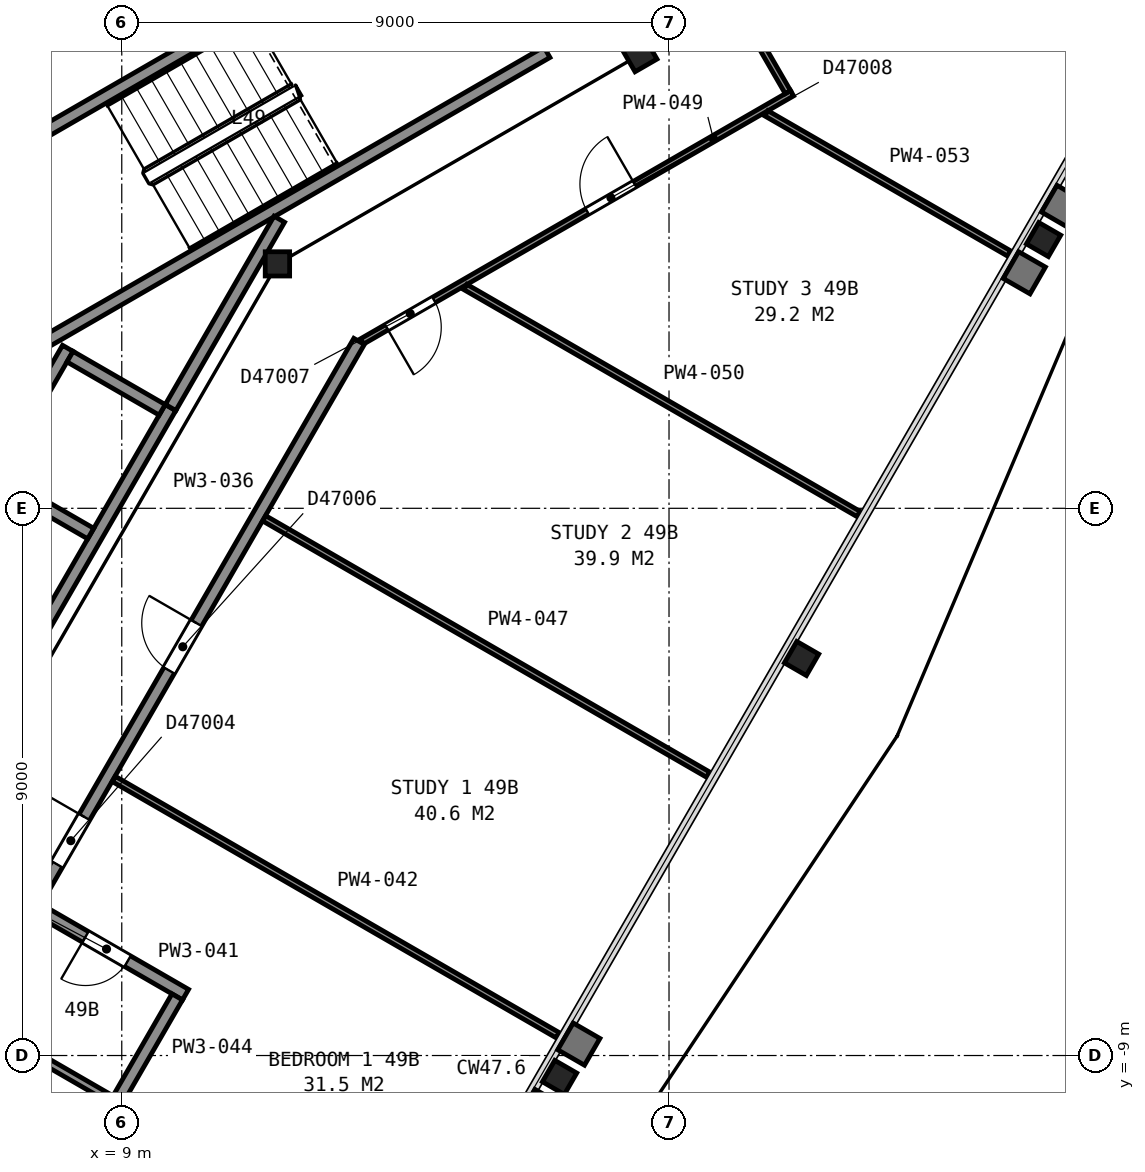
"""IFC4 building model, lengths in metres.
Left out: names, types, materials, properties, quantities, classifications, styles, units other than length and angle.
Written with IfcOpenShell. Run it as: python <this file> out.ifc"""

import sys

from ifc_helpers import new_model, si_unit, direction, frame, frame_2d, origin, origin_2d, place, context, subcontext, project, spatial, rectangle, i_section, extrude, element, fill, save


model = new_model("IFC4")
c1 = context("Model", 3, precision=1e-05, world=origin(), true_north=direction((0.0, 1.0)))
c2 = subcontext(c1, "Body", "Model", "MODEL_VIEW")
j1 = project(units=[si_unit("LENGTHUNIT", "METRE"), si_unit("PLANEANGLEUNIT", "RADIAN")], contexts=[c1])
p1 = place(None, origin())
s1 = spatial("IfcSite", under=j1, at=p1, CompositionType="ELEMENT")
p2 = place(p1, origin())
s2 = spatial("IfcBuilding", under=s1, at=p2, CompositionType="ELEMENT")
p3 = place(p2, frame((0.0, 0.0, 196.9)))
s3 = spatial("IfcBuildingStorey", under=s2, at=p3, CompositionType="ELEMENT", Elevation=196.9)
for number, where, z_axis, x_axis in (
    (1, (16.2, -9.36, 0.0), (0.0, 0.0, 1.0), (-0.5, -0.866, 0.0)),
    (2, (20.18, -2.47, 0.0), (0.0, 0.0, 1.0), (-0.5, -0.866, 0.0)),
    (3, (24.16, 4.42, 0.0), (0.0, 0.0, 1.0), (-0.5, -0.866, 0.0)),
):
    element("IfcColumn", number, at=place(p3, frame(where, z_axis=z_axis, x_axis=x_axis)), inside=s3, PredefinedType="COLUMN", context=c2, shape_type="SweptSolid", body=[
        extrude(i_section(OverallWidth=0.406, OverallDepth=0.417, WebThickness=0.03, FlangeThickness=0.048, FilletRadius=0.015, at=origin_2d()), origin(), (0.0, 0.0, 1.0), 3.01),
    ])
p4 = place(p3, frame((11.56, 4.02, 0.0), z_axis=(0.0, 0.0, 1.0), x_axis=(1.0, 0.0, 0.0)))
e4 = element("IfcColumn", 4, at=p4, inside=s3, PredefinedType="COLUMN", context=c2, shape_type="SweptSolid", body=[
    extrude(i_section(OverallWidth=0.401, OverallDepth=0.399, WebThickness=0.025, FlangeThickness=0.04, FilletRadius=0.015, at=origin_2d()), origin(), (0.0, 0.0, 1.0), 3.7),
])
p5 = place(p3, frame((17.52, 7.46, 0.0), z_axis=(0.0, 0.0, 1.0), x_axis=(0.5, -0.866025403784, 0.0)))
e5 = element("IfcColumn", 5, at=p5, inside=s3, PredefinedType="COLUMN", context=c2, shape_type="SweptSolid", body=[
    extrude(i_section(OverallWidth=0.406, OverallDepth=0.417, WebThickness=0.03, FlangeThickness=0.048, FilletRadius=0.015, at=origin_2d()), origin(), (0.0, 0.0, 1.0), 3.7),
])
p6 = place(p3, frame((15.855, 7.538, 0.0), z_axis=(0.0, 0.0, 1.0), x_axis=(-0.500049511043, 0.865996816683, 0.0)))
e6 = element("IfcWall", 6, at=p6, inside=s3, PredefinedType="PARTITIONING", context=c2, shape_type="SweptSolid", body=[
    extrude(rectangle(XDim=2.8, YDim=0.2, at=frame_2d((1.4, 0.0))), origin(), (0.0, 0.0, 1.0), 3.45),
])
p7 = place(p6, frame((0.85, 0.0, 0.0)))
e7 = element("IfcOpeningElement", 7, at=p7, cuts=e6, PredefinedType="OPENING", context=c2, shape_type="SweptSolid", body=[
    extrude(rectangle(XDim=1.1, YDim=2.1, at=frame_2d((0.55, 1.05))), frame((0.0, 0.11, 0.0), z_axis=(0.0, -1.0, 0.0), x_axis=(1.0, 0.0, 0.0)), (0.0, 0.0, 1.0), 0.22),
])
for number, where, z_axis, x_axis in (
    (8, (6.178, 5.299, 0.0), (0.0, 0.0, 1.0), (0.866, 0.5, 0.0)),
    (9, (7.678, 2.701, 0.0), (0.0, 0.0, 1.0), (0.866, 0.5, 0.0)),
):
    element("IfcWall", number, at=place(p3, frame(where, z_axis=z_axis, x_axis=x_axis)), inside=s3, PredefinedType="PARTITIONING", context=c2, shape_type="SweptSolid", body=[
        extrude(rectangle(XDim=9.6, YDim=0.2, at=frame_2d((4.8, 0.0))), origin(), (0.0, 0.0, 1.0), 3.45),
    ])
p8 = place(p3, frame((7.351, -2.587, 0.0), z_axis=(0.0, 0.0, 1.0), x_axis=(0.500002801628, 0.866023786258, 0.0)))
e10 = element("IfcWall", 10, at=p8, inside=s3, PredefinedType="PARTITIONING", context=c2, shape_type="SweptSolid", body=[
    extrude(rectangle(XDim=4.9, YDim=0.2, at=frame_2d((2.45, 0.0))), origin(), (0.0, 0.0, 1.0), 3.7),
])
p9 = place(p3, frame((5.663, -1.612, 0.0), z_axis=(0.0, 0.0, 1.0), x_axis=(0.49998122708, 0.866036242063, 0.0)))
e11 = element("IfcWall", 11, at=p9, inside=s3, PredefinedType="PARTITIONING", context=c2, shape_type="SweptSolid", body=[
    extrude(rectangle(XDim=4.9, YDim=0.2, at=frame_2d((2.45, 0.0))), origin(), (0.0, 0.0, 1.0), 3.7),
])
p10 = place(p3, frame((9.665, 1.62, 0.0), z_axis=(0.0, 0.0, 1.0), x_axis=(-0.866002029911, 0.500040482552, 0.0)))
e12 = element("IfcWall", 12, at=p10, inside=s3, PredefinedType="PARTITIONING", context=c2, shape_type="SweptSolid", body=[
    extrude(rectangle(XDim=1.75, YDim=0.2, at=frame_2d((0.875, 0.0))), origin(), (0.0, 0.0, 1.0), 3.7),
])
p11 = place(p3, frame((8.49, -0.416, 0.0), z_axis=(0.0, 0.0, 1.0), x_axis=(-0.866036909293, 0.499980071345, 0.0)))
e13 = element("IfcWall", 13, at=p11, inside=s3, PredefinedType="PARTITIONING", context=c2, shape_type="SweptSolid", body=[
    extrude(rectangle(XDim=1.75, YDim=0.2, at=frame_2d((0.875, 0.0))), origin(), (0.0, 0.0, 1.0), 3.7),
])
p12 = place(p3, frame((9.803, 1.658, 0.0), z_axis=(0.0, 0.0, 1.0), x_axis=(0.499943114462, 0.866058244174, 0.0)))
e14 = element("IfcWall", 14, at=p12, inside=s3, PredefinedType="PARTITIONING", context=c2, shape_type="SweptSolid", body=[
    extrude(rectangle(XDim=3.576, YDim=0.2, at=frame_2d((1.788, 0.0))), origin(), (0.0, 0.0, 1.0), 3.45),
])
p13 = place(p3, frame((12.903, 2.745, 0.0), z_axis=(0.0, 0.0, 1.0), x_axis=(-0.499992063946, -0.866029985619, 0.0)))
e15 = element("IfcWall", 15, at=p13, inside=s3, PredefinedType="PARTITIONING", context=c2, shape_type="SweptSolid", body=[
    extrude(rectangle(XDim=12.907, YDim=0.2, at=frame_2d((6.454, 0.0))), origin(), (0.0, 0.0, 1.0), 2.362),
])
p14 = place(p13, frame((9.032, 0.0, 0.0)))
e16 = element("IfcOpeningElement", 16, at=p14, cuts=e15, PredefinedType="OPENING", context=c2, shape_type="SweptSolid", body=[
    extrude(rectangle(XDim=0.9, YDim=2.1, at=frame_2d((0.45, 1.05))), frame((0.0, 0.11, 0.0), z_axis=(0.0, -1.0, 0.0), x_axis=(1.0, 0.0, 0.0)), (0.0, 0.0, 1.0), 0.22),
])
p15 = place(p13, frame((5.349, 0.0, 0.0)))
e17 = element("IfcOpeningElement", 17, at=p15, cuts=e15, PredefinedType="OPENING", context=c2, shape_type="SweptSolid", body=[
    extrude(rectangle(XDim=0.9, YDim=2.1, at=frame_2d((0.45, 1.05))), frame((0.0, 0.11, 0.0), z_axis=(0.0, -1.0, 0.0), x_axis=(1.0, 0.0, 0.0)), (0.0, 0.0, 1.0), 0.22),
])
p16 = place(p3, frame((6.576, -8.419, 0.0), z_axis=(0.0, 0.0, 1.0), x_axis=(0.866048155274, -0.499960591193, 0.0)))
e18 = element("IfcWall", 18, at=p16, inside=s3, PredefinedType="PARTITIONING", context=c2, shape_type="SweptSolid", body=[
    extrude(rectangle(XDim=8.431, YDim=0.125, at=frame_2d((4.215, 0.0))), origin(), (0.0, 0.0, 1.0), 2.362),
])
p17 = place(p3, frame((10.049, -7.999, 0.0), z_axis=(0.0, 0.0, 1.0), x_axis=(-0.866041588165, 0.499971966783, 0.0)))
e19 = element("IfcWall", 19, at=p17, inside=s3, PredefinedType="PARTITIONING", context=c2, shape_type="SweptSolid", body=[
    extrude(rectangle(XDim=2.795, YDim=0.2, at=frame_2d((1.397, 0.0))), origin(), (0.0, 0.0, 1.0), 2.362),
])
p18 = place(p17, frame((1.1, 0.0, 0.0)))
e20 = element("IfcOpeningElement", 20, at=p18, cuts=e19, PredefinedType="OPENING", context=c2, shape_type="SweptSolid", body=[
    extrude(rectangle(XDim=0.8, YDim=2.1, at=frame_2d((0.4, 1.05))), frame((0.0, 0.11, 0.0), z_axis=(0.0, -1.0, 0.0), x_axis=(1.0, 0.0, 0.0)), (0.0, 0.0, 1.0), 0.22),
])
p19 = place(p3, frame((8.869, -4.451, 0.0), z_axis=(0.0, 0.0, 1.0), x_axis=(0.866027858276, -0.499995748672, 0.0)))
e21 = element("IfcWall", 21, at=p19, inside=s3, PredefinedType="PARTITIONING", context=c2, shape_type="SweptSolid", body=[
    extrude(rectangle(XDim=8.429, YDim=0.1, at=frame_2d((4.214, 0.0))), origin(), (0.0, 0.0, 1.0), 2.362),
])
p20 = place(p3, frame((8.946, -9.709, 0.0), z_axis=(0.0, 0.0, 1.0), x_axis=(0.499970304126, 0.866042548026, 0.0)))
e22 = element("IfcWall", 22, at=p20, inside=s3, PredefinedType="PARTITIONING", context=c2, shape_type="SweptSolid", body=[
    extrude(rectangle(XDim=1.933, YDim=0.2, at=frame_2d((0.966, 0.0))), origin(), (0.0, 0.0, 1.0), 2.362),
])
p21 = place(p3, frame((11.343, -0.166, 0.0), z_axis=(0.0, 0.0, 1.0), x_axis=(0.866022557401, -0.500004930048, 0.0)))
e23 = element("IfcWall", 23, at=p21, inside=s3, PredefinedType="PARTITIONING", context=c2, shape_type="SweptSolid", body=[
    extrude(rectangle(XDim=8.429, YDim=0.1, at=frame_2d((4.215, 0.0))), origin(), (0.0, 0.0, 1.0), 2.362),
])
p22 = place(p3, frame((20.023, 6.826, 0.0), z_axis=(0.0, 0.0, 1.0), x_axis=(-0.86608949446, -0.499888975259, 0.0)))
e24 = element("IfcWall", 24, at=p22, inside=s3, PredefinedType="PARTITIONING", context=c2, shape_type="SweptSolid", body=[
    extrude(rectangle(XDim=8.165, YDim=0.1, at=frame_2d((4.083, 0.0))), origin(), (0.0, 0.0, 1.0), 2.362),
])
p23 = place(p22, frame((6.8, 0.0, 0.0)))
e25 = element("IfcOpeningElement", 25, at=p23, cuts=e24, PredefinedType="OPENING", context=c2, shape_type="SweptSolid", body=[
    extrude(rectangle(XDim=0.9, YDim=2.1, at=frame_2d((0.45, 1.05))), frame((0.0, 0.06, 0.0), z_axis=(0.0, -1.0, 0.0), x_axis=(1.0, 0.0, 0.0)), (0.0, 0.0, 1.0), 0.12),
])
p24 = place(p22, frame((2.989, 0.0, 0.0)))
e26 = element("IfcOpeningElement", 26, at=p24, cuts=e24, PredefinedType="OPENING", context=c2, shape_type="SweptSolid", body=[
    extrude(rectangle(XDim=0.9, YDim=2.1, at=frame_2d((0.45, 1.05))), frame((0.0, 0.06, 0.0), z_axis=(0.0, -1.0, 0.0), x_axis=(1.0, 0.0, 0.0)), (0.0, 0.0, 1.0), 0.12),
])
p25 = place(p3, frame((14.651, 3.64, 0.0), z_axis=(0.0, 0.0, 1.0), x_axis=(0.866021145342, -0.500007375767, 0.0)))
e27 = element("IfcWall", 27, at=p25, inside=s3, PredefinedType="PARTITIONING", context=c2, shape_type="SweptSolid", body=[
    extrude(rectangle(XDim=7.467, YDim=0.1, at=frame_2d((3.733, 0.0))), origin(), (0.0, 0.0, 1.0), 2.362),
])
p26 = place(p3, frame((15.928, 13.812, 0.0), z_axis=(0.0, 0.0, 1.0), x_axis=(0.500422653123, -0.865781247337, 0.0)))
e28 = element("IfcWall", 28, at=p26, inside=s3, PredefinedType="PARTITIONING", context=c2, shape_type="SweptSolid", body=[
    extrude(rectangle(XDim=8.047, YDim=0.1, at=frame_2d((4.024, 0.0))), origin(), (0.0, 0.0, 1.0), 2.362),
])
p27 = place(p26, frame((3.4, 0.0, 0.0)))
e29 = element("IfcOpeningElement", 29, at=p27, cuts=e28, PredefinedType="OPENING", context=c2, shape_type="SweptSolid", body=[
    extrude(rectangle(XDim=1.2, YDim=2.1, at=frame_2d((0.6, 1.05))), frame((0.0, 0.06, 0.0), z_axis=(0.0, -1.0, 0.0), x_axis=(1.0, 0.0, 0.0)), (0.0, 0.0, 1.0), 0.12),
])
p28 = place(p3, frame((19.601, 6.496, 0.0), z_axis=(0.0, 0.0, 1.0), x_axis=(0.866056775574, -0.499945658529, 0.0)))
e30 = element("IfcWall", 30, at=p28, inside=s3, PredefinedType="PARTITIONING", context=c2, shape_type="SweptSolid", body=[
    extrude(rectangle(XDim=4.608, YDim=0.1, at=frame_2d((2.304, 0.0))), origin(), (0.0, 0.0, 1.0), 2.362),
])
p29 = place(p14, origin())
e31 = element("IfcDoor", 31, at=p29, inside=s3, OperationType="SINGLE_SWING_LEFT", PredefinedType="DOOR", context=c2, shape_type="SweptSolid", body=[
    extrude(rectangle(XDim=0.9, YDim=2.1, at=frame_2d((0.45, 1.05))), frame((0.0, 0.025, 0.0), z_axis=(0.0, -1.0, 0.0), x_axis=(1.0, 0.0, 0.0)), (0.0, 0.0, 1.0), 0.05),
])
fill(e16, e31)
p30 = place(p15, origin())
e32 = element("IfcDoor", 32, at=p30, inside=s3, OperationType="SINGLE_SWING_LEFT", PredefinedType="DOOR", context=c2, shape_type="SweptSolid", body=[
    extrude(rectangle(XDim=0.9, YDim=2.1, at=frame_2d((0.45, 1.05))), frame((0.0, 0.025, 0.0), z_axis=(0.0, -1.0, 0.0), x_axis=(1.0, 0.0, 0.0)), (0.0, 0.0, 1.0), 0.05),
])
fill(e17, e32)
p31 = place(p18, origin())
e33 = element("IfcDoor", 33, at=p31, inside=s3, OperationType="SINGLE_SWING_RIGHT", PredefinedType="DOOR", context=c2, shape_type="SweptSolid", body=[
    extrude(rectangle(XDim=0.8, YDim=2.1, at=frame_2d((0.4, 1.05))), frame((0.0, 0.025, 0.0), z_axis=(0.0, -1.0, 0.0), x_axis=(1.0, 0.0, 0.0)), (0.0, 0.0, 1.0), 0.05),
])
fill(e20, e33)
p32 = place(p23, origin())
e34 = element("IfcDoor", 34, at=p32, inside=s3, OperationType="SINGLE_SWING_RIGHT", PredefinedType="DOOR", context=c2, shape_type="SweptSolid", body=[
    extrude(rectangle(XDim=0.9, YDim=2.1, at=frame_2d((0.45, 1.05))), frame((0.0, 0.025, 0.0), z_axis=(0.0, -1.0, 0.0), x_axis=(1.0, 0.0, 0.0)), (0.0, 0.0, 1.0), 0.05),
])
fill(e25, e34)
p33 = place(p24, origin())
e35 = element("IfcDoor", 35, at=p33, inside=s3, OperationType="SINGLE_SWING_LEFT", PredefinedType="DOOR", context=c2, shape_type="SweptSolid", body=[
    extrude(rectangle(XDim=0.9, YDim=2.1, at=frame_2d((0.45, 1.05))), frame((0.0, 0.025, 0.0), z_axis=(0.0, -1.0, 0.0), x_axis=(1.0, 0.0, 0.0)), (0.0, 0.0, 1.0), 0.05),
])
fill(e26, e35)
save(model, sys.argv[1])
